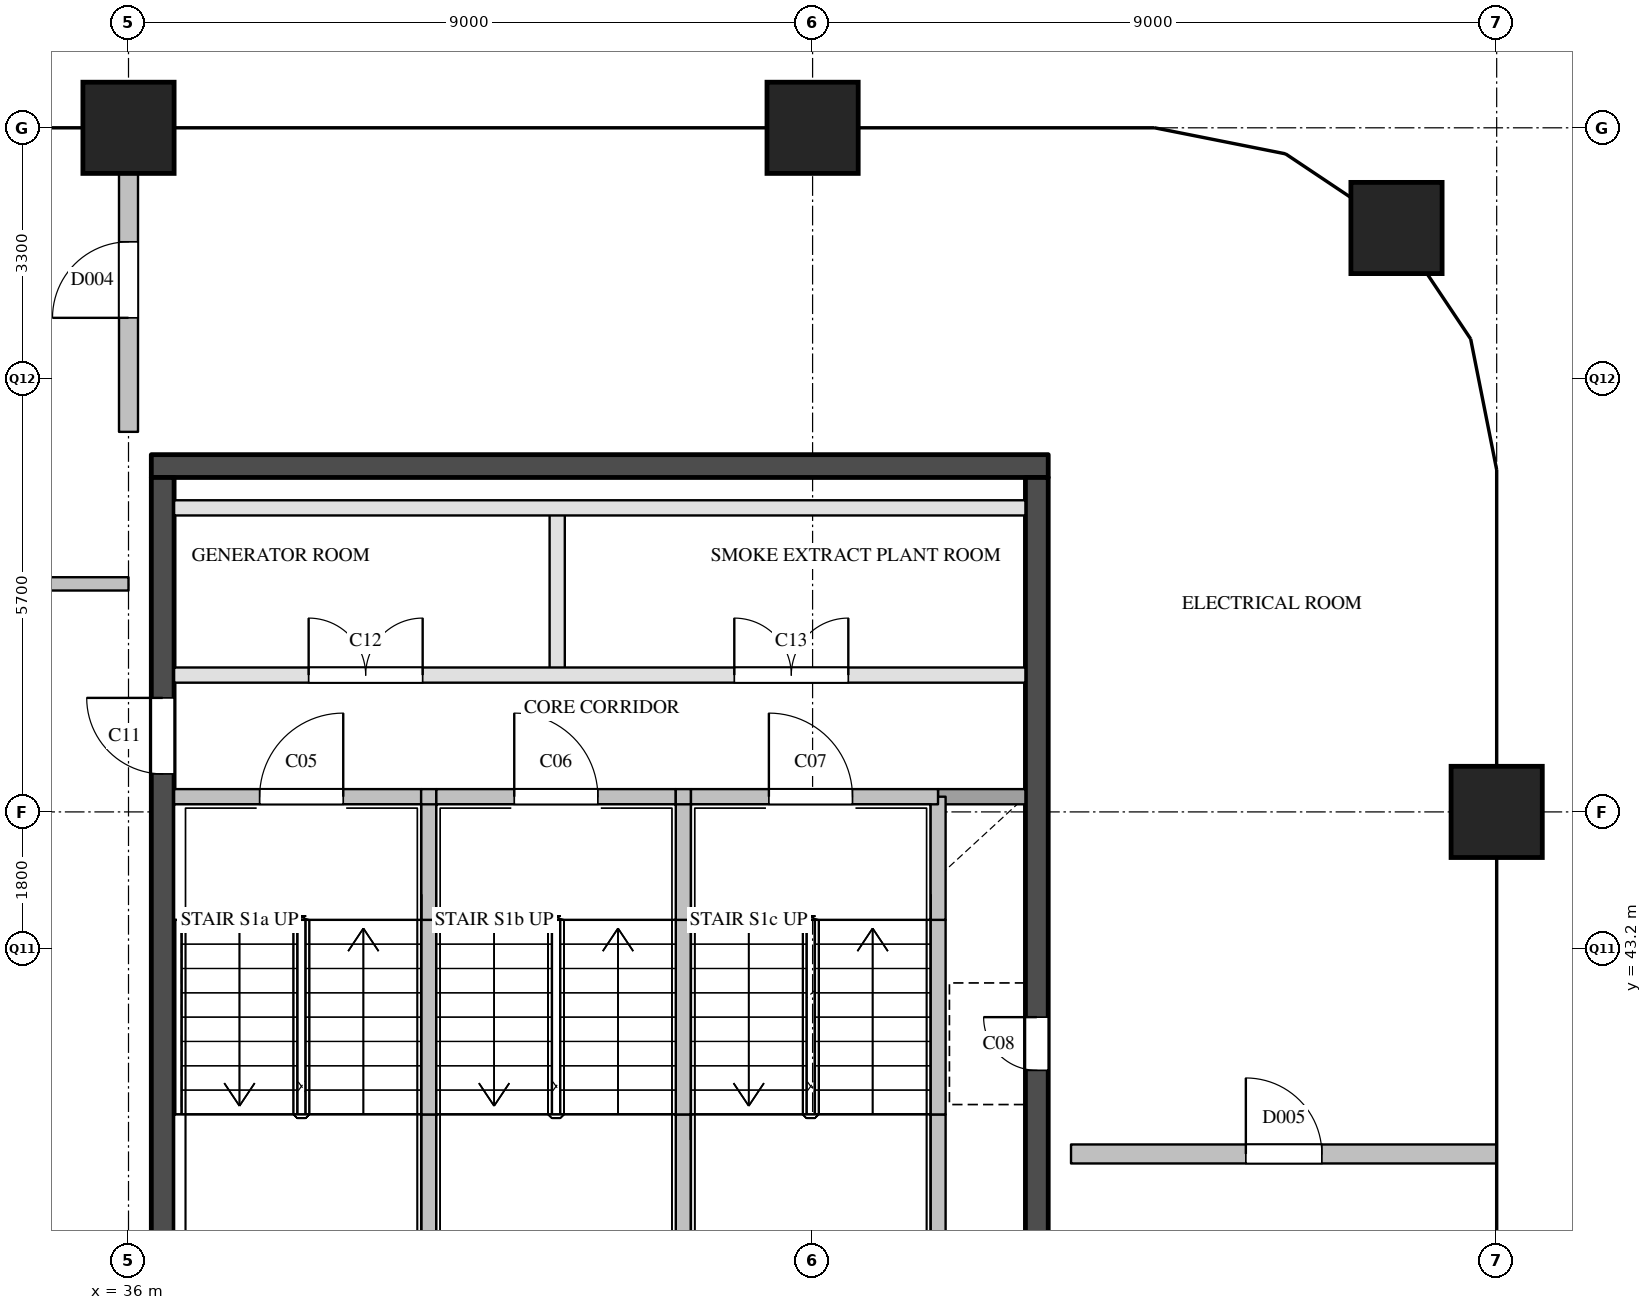
"""IFC4 building model, lengths in metres.
Left out: names, types, materials, properties, quantities, classifications, styles, units other than length and angle.
Written with IfcOpenShell. Run it as: python <this file> out.ifc"""

import sys

from ifc_helpers import new_model, si_unit, direction, frame, frame_2d, origin, origin_2d, place, context, subcontext, project, spatial, rectangle, extrude, element, fill, save


model = new_model("IFC4")
c1 = context("Model", 3, precision=1e-05, world=origin(), true_north=direction((0.0, 1.0)))
c2 = subcontext(c1, "Body", "Model", "MODEL_VIEW")
j1 = project(units=[si_unit("LENGTHUNIT", "METRE"), si_unit("PLANEANGLEUNIT", "RADIAN")], contexts=[c1])
p1 = place(None, origin())
s1 = spatial("IfcSite", under=j1, at=p1, CompositionType="ELEMENT")
p2 = place(p1, origin())
s2 = spatial("IfcBuilding", under=s1, at=p2, CompositionType="ELEMENT")
p3 = place(p2, frame((0.0, 0.0, 295.2)))
s3 = spatial("IfcBuildingStorey", under=s2, at=p3, CompositionType="ELEMENT", Elevation=295.2)
for number, where, z_axis, x_axis in (
    (1, (36.0, 54.0, 0.0), (0.0, 0.0, 1.0), (1.0, 0.0, 0.0)),
    (2, (45.0, 54.0, 0.0), (0.0, 0.0, 1.0), (1.0, 0.0, 0.0)),
    (3, (54.0, 45.0, 0.0), (0.0, 0.0, 1.0), (1.0, 0.0, 0.0)),
    (4, (52.682, 52.682, 0.0), (0.0, 0.0, 1.0), (1.0, 0.0, 0.0)),
):
    element("IfcColumn", number, at=place(p3, frame(where, z_axis=z_axis, x_axis=x_axis)), inside=s3, PredefinedType="COLUMN", context=c2, shape_type="SweptSolid", body=[
        extrude(rectangle(XDim=1.2, YDim=1.2, at=origin_2d()), origin(), (0.0, 0.0, 1.0), 6.0),
    ])
p4 = place(p3, frame((36.3, 49.55, 0.0), z_axis=(0.0, 0.0, 1.0), x_axis=(1.0, 0.0, 0.0)))
e5 = element("IfcWall", 5, at=p4, inside=s3, PredefinedType="SHEAR", context=c2, shape_type="SweptSolid", body=[
    extrude(rectangle(XDim=11.8, YDim=0.3, at=frame_2d((5.9, 0.0))), origin(), (0.0, 0.0, 1.0), 5.7),
])
p5 = place(p3, frame((36.45, 29.1, 0.0), z_axis=(0.0, 0.0, 1.0), x_axis=(0.0, 1.0, 0.0)))
e6 = element("IfcWall", 6, at=p5, inside=s3, PredefinedType="SHEAR", context=c2, shape_type="SweptSolid", body=[
    extrude(rectangle(XDim=20.3, YDim=0.3, at=frame_2d((10.15, 0.0))), origin(), (0.0, 0.0, 1.0), 5.7),
])
p6 = place(p5, frame((3.6, 0.0, 0.0)))
e7 = element("IfcOpeningElement", 7, at=p6, cuts=e6, PredefinedType="OPENING", context=c2, shape_type="SweptSolid", body=[
    extrude(rectangle(XDim=1.8, YDim=2.1, at=frame_2d((0.9, 1.05))), frame((0.0, 0.16, 0.0), z_axis=(0.0, -1.0, 0.0), x_axis=(1.0, 0.0, 0.0)), (0.0, 0.0, 1.0), 0.32),
])
p7 = place(p5, frame((16.4, 0.0, 0.0)))
e8 = element("IfcOpeningElement", 8, at=p7, cuts=e6, PredefinedType="OPENING", context=c2, shape_type="SweptSolid", body=[
    extrude(rectangle(XDim=1.0, YDim=2.1, at=frame_2d((0.5, 1.05))), frame((0.0, 0.16, 0.0), z_axis=(0.0, -1.0, 0.0), x_axis=(1.0, 0.0, 0.0)), (0.0, 0.0, 1.0), 0.32),
])
p8 = place(p3, frame((47.95, 29.1, 0.0), z_axis=(0.0, 0.0, 1.0), x_axis=(0.0, 1.0, 0.0)))
e9 = element("IfcWall", 9, at=p8, inside=s3, PredefinedType="SHEAR", context=c2, shape_type="SweptSolid", body=[
    extrude(rectangle(XDim=20.3, YDim=0.3, at=frame_2d((10.15, 0.0))), origin(), (0.0, 0.0, 1.0), 5.7),
])
p9 = place(p8, frame((12.5, 0.0, 0.0)))
e10 = element("IfcOpeningElement", 10, at=p9, cuts=e9, PredefinedType="OPENING", context=c2, shape_type="SweptSolid", body=[
    extrude(rectangle(XDim=0.7, YDim=2.1, at=frame_2d((0.35, 1.05))), frame((0.0, 0.16, 0.0), z_axis=(0.0, -1.0, 0.0), x_axis=(1.0, 0.0, 0.0)), (0.0, 0.0, 1.0), 0.32),
])
p10 = place(p3, frame((39.95, 39.0, 0.0), z_axis=(0.0, 0.0, 1.0), x_axis=(0.0, 1.0, 0.0)))
e11 = element("IfcWall", 11, at=p10, inside=s3, PredefinedType="SOLIDWALL", context=c2, shape_type="SweptSolid", body=[
    extrude(rectangle(XDim=2.02, YDim=0.2, at=frame_2d((1.01, 0.0))), origin(), (0.0, 0.0, 1.0), 5.7),
])
p11 = place(p3, frame((39.95, 41.02, 0.0), z_axis=(0.0, 0.0, 1.0), x_axis=(0.0, 1.0, 0.0)))
e12 = element("IfcWall", 12, at=p11, inside=s3, PredefinedType="SOLIDWALL", context=c2, shape_type="SweptSolid", body=[
    extrude(rectangle(XDim=2.56, YDim=0.2, at=frame_2d((1.28, 0.0))), origin(), (0.0, 0.0, 1.0), 5.7),
])
p12 = place(p3, frame((39.95, 43.58, 0.0), z_axis=(0.0, 0.0, 1.0), x_axis=(0.0, 1.0, 0.0)))
e13 = element("IfcWall", 13, at=p12, inside=s3, PredefinedType="SOLIDWALL", context=c2, shape_type="SweptSolid", body=[
    extrude(rectangle(XDim=1.62, YDim=0.2, at=frame_2d((0.81, 0.0))), origin(), (0.0, 0.0, 1.0), 5.7),
])
p13 = place(p3, frame((41.64, 46.8, 0.0), z_axis=(0.0, 0.0, 1.0), x_axis=(0.0, 1.0, 0.0)))
e14 = element("IfcWall", 14, at=p13, inside=s3, PredefinedType="PARTITIONING", context=c2, shape_type="SweptSolid", body=[
    extrude(rectangle(XDim=2.2, YDim=0.2, at=frame_2d((1.1, 0.0))), origin(), (0.0, 0.0, 1.0), 5.7),
])
p14 = place(p3, frame((43.3, 39.0, 0.0), z_axis=(0.0, 0.0, 1.0), x_axis=(0.0, 1.0, 0.0)))
e15 = element("IfcWall", 15, at=p14, inside=s3, PredefinedType="SOLIDWALL", context=c2, shape_type="SweptSolid", body=[
    extrude(rectangle(XDim=2.02, YDim=0.2, at=frame_2d((1.01, 0.0))), origin(), (0.0, 0.0, 1.0), 5.7),
])
p15 = place(p3, frame((43.3, 41.02, 0.0), z_axis=(0.0, 0.0, 1.0), x_axis=(0.0, 1.0, 0.0)))
e16 = element("IfcWall", 16, at=p15, inside=s3, PredefinedType="SOLIDWALL", context=c2, shape_type="SweptSolid", body=[
    extrude(rectangle(XDim=2.56, YDim=0.2, at=frame_2d((1.28, 0.0))), origin(), (0.0, 0.0, 1.0), 5.7),
])
p16 = place(p3, frame((43.3, 43.58, 0.0), z_axis=(0.0, 0.0, 1.0), x_axis=(0.0, 1.0, 0.0)))
e17 = element("IfcWall", 17, at=p16, inside=s3, PredefinedType="SOLIDWALL", context=c2, shape_type="SweptSolid", body=[
    extrude(rectangle(XDim=1.62, YDim=0.2, at=frame_2d((0.81, 0.0))), origin(), (0.0, 0.0, 1.0), 5.7),
])
p17 = place(p3, frame((46.65, 39.0, 0.0), z_axis=(0.0, 0.0, 1.0), x_axis=(0.0, 1.0, 0.0)))
e18 = element("IfcWall", 18, at=p17, inside=s3, PredefinedType="SOLIDWALL", context=c2, shape_type="SweptSolid", body=[
    extrude(rectangle(XDim=2.02, YDim=0.2, at=frame_2d((1.01, 0.0))), origin(), (0.0, 0.0, 1.0), 5.7),
])
p18 = place(p3, frame((46.65, 41.02, 0.0), z_axis=(0.0, 0.0, 1.0), x_axis=(0.0, 1.0, 0.0)))
e19 = element("IfcWall", 19, at=p18, inside=s3, PredefinedType="SOLIDWALL", context=c2, shape_type="SweptSolid", body=[
    extrude(rectangle(XDim=2.56, YDim=0.2, at=frame_2d((1.28, 0.0))), origin(), (0.0, 0.0, 1.0), 5.7),
])
p19 = place(p3, frame((46.65, 43.58, 0.0), z_axis=(0.0, 0.0, 1.0), x_axis=(0.0, 1.0, 0.0)))
e20 = element("IfcWall", 20, at=p19, inside=s3, PredefinedType="SOLIDWALL", context=c2, shape_type="SweptSolid", body=[
    extrude(rectangle(XDim=1.62, YDim=0.2, at=frame_2d((0.81, 0.0))), origin(), (0.0, 0.0, 1.0), 5.7),
])
p20 = place(p3, frame((46.65, 45.2, 0.0), z_axis=(0.0, 0.0, 1.0), x_axis=(1.0, 0.0, 0.0)))
e21 = element("IfcWall", 21, at=p20, inside=s3, PredefinedType="SOLIDWALL", context=c2, shape_type="SweptSolid", body=[
    extrude(rectangle(XDim=1.15, YDim=0.2, at=frame_2d((0.575, 0.0))), origin(), (0.0, 0.0, 1.0), 5.7),
])
p21 = place(p3, frame((36.6, 45.2, 0.0), z_axis=(0.0, 0.0, 1.0), x_axis=(1.0, 0.0, 0.0)))
e22 = element("IfcWall", 22, at=p21, inside=s3, PredefinedType="SOLIDWALL", context=c2, shape_type="SweptSolid", body=[
    extrude(rectangle(XDim=3.25, YDim=0.2, at=frame_2d((1.625, 0.0))), origin(), (0.0, 0.0, 1.0), 5.7),
])
p22 = place(p21, frame((1.125, 0.0, 0.0)))
e23 = element("IfcOpeningElement", 23, at=p22, cuts=e22, PredefinedType="OPENING", context=c2, shape_type="SweptSolid", body=[
    extrude(rectangle(XDim=1.1, YDim=2.1, at=frame_2d((0.55, 1.05))), frame((0.0, 0.11, 0.0), z_axis=(0.0, -1.0, 0.0), x_axis=(1.0, 0.0, 0.0)), (0.0, 0.0, 1.0), 0.22),
])
p23 = place(p3, frame((39.85, 45.2, 0.0), z_axis=(0.0, 0.0, 1.0), x_axis=(1.0, 0.0, 0.0)))
e24 = element("IfcWall", 24, at=p23, inside=s3, PredefinedType="SOLIDWALL", context=c2, shape_type="SweptSolid", body=[
    extrude(rectangle(XDim=0.2, YDim=0.2, at=frame_2d((0.1, 0.0))), origin(), (0.0, 0.0, 1.0), 5.7),
])
p24 = place(p3, frame((40.05, 45.2, 0.0), z_axis=(0.0, 0.0, 1.0), x_axis=(1.0, 0.0, 0.0)))
e25 = element("IfcWall", 25, at=p24, inside=s3, PredefinedType="SOLIDWALL", context=c2, shape_type="SweptSolid", body=[
    extrude(rectangle(XDim=3.15, YDim=0.2, at=frame_2d((1.575, 0.0))), origin(), (0.0, 0.0, 1.0), 5.7),
])
p25 = place(p24, frame((1.025, 0.0, 0.0)))
e26 = element("IfcOpeningElement", 26, at=p25, cuts=e25, PredefinedType="OPENING", context=c2, shape_type="SweptSolid", body=[
    extrude(rectangle(XDim=1.1, YDim=2.1, at=frame_2d((0.55, 1.05))), frame((0.0, 0.11, 0.0), z_axis=(0.0, -1.0, 0.0), x_axis=(1.0, 0.0, 0.0)), (0.0, 0.0, 1.0), 0.22),
])
p26 = place(p3, frame((43.2, 45.2, 0.0), z_axis=(0.0, 0.0, 1.0), x_axis=(1.0, 0.0, 0.0)))
e27 = element("IfcWall", 27, at=p26, inside=s3, PredefinedType="SOLIDWALL", context=c2, shape_type="SweptSolid", body=[
    extrude(rectangle(XDim=0.2, YDim=0.2, at=frame_2d((0.1, 0.0))), origin(), (0.0, 0.0, 1.0), 5.7),
])
p27 = place(p3, frame((43.4, 45.2, 0.0), z_axis=(0.0, 0.0, 1.0), x_axis=(1.0, 0.0, 0.0)))
e28 = element("IfcWall", 28, at=p27, inside=s3, PredefinedType="SOLIDWALL", context=c2, shape_type="SweptSolid", body=[
    extrude(rectangle(XDim=3.25, YDim=0.2, at=frame_2d((1.625, 0.0))), origin(), (0.0, 0.0, 1.0), 5.7),
])
p28 = place(p27, frame((1.025, 0.0, 0.0)))
e29 = element("IfcOpeningElement", 29, at=p28, cuts=e28, PredefinedType="OPENING", context=c2, shape_type="SweptSolid", body=[
    extrude(rectangle(XDim=1.1, YDim=2.1, at=frame_2d((0.55, 1.05))), frame((0.0, 0.11, 0.0), z_axis=(0.0, -1.0, 0.0), x_axis=(1.0, 0.0, 0.0)), (0.0, 0.0, 1.0), 0.22),
])
p29 = place(p3, frame((36.6, 46.8, 0.0), z_axis=(0.0, 0.0, 1.0), x_axis=(1.0, 0.0, 0.0)))
e30 = element("IfcWall", 30, at=p29, inside=s3, PredefinedType="PARTITIONING", context=c2, shape_type="SweptSolid", body=[
    extrude(rectangle(XDim=11.2, YDim=0.2, at=frame_2d((5.6, 0.0))), origin(), (0.0, 0.0, 1.0), 5.7),
])
p30 = place(p29, frame((1.77, 0.0, 0.0)))
e31 = element("IfcOpeningElement", 31, at=p30, cuts=e30, PredefinedType="OPENING", context=c2, shape_type="SweptSolid", body=[
    extrude(rectangle(XDim=1.5, YDim=2.1, at=frame_2d((0.75, 1.05))), frame((0.0, 0.11, 0.0), z_axis=(0.0, -1.0, 0.0), x_axis=(1.0, 0.0, 0.0)), (0.0, 0.0, 1.0), 0.22),
])
p31 = place(p29, frame((7.37, 0.0, 0.0)))
e32 = element("IfcOpeningElement", 32, at=p31, cuts=e30, PredefinedType="OPENING", context=c2, shape_type="SweptSolid", body=[
    extrude(rectangle(XDim=1.5, YDim=2.1, at=frame_2d((0.75, 1.05))), frame((0.0, 0.11, 0.0), z_axis=(0.0, -1.0, 0.0), x_axis=(1.0, 0.0, 0.0)), (0.0, 0.0, 1.0), 0.22),
])
p32 = place(p3, frame((36.6, 49.0, 0.0), z_axis=(0.0, 0.0, 1.0), x_axis=(1.0, 0.0, 0.0)))
e33 = element("IfcWall", 33, at=p32, inside=s3, PredefinedType="PARTITIONING", context=c2, shape_type="SweptSolid", body=[
    extrude(rectangle(XDim=11.2, YDim=0.2, at=frame_2d((5.6, 0.0))), origin(), (0.0, 0.0, 1.0), 5.7),
])
p33 = place(p3, frame((24.0, 48.0, 0.0), z_axis=(0.0, 0.0, 1.0), x_axis=(1.0, 0.0, 0.0)))
e34 = element("IfcWall", 34, at=p33, inside=s3, PredefinedType="PARTITIONING", context=c2, shape_type="SweptSolid", body=[
    extrude(rectangle(XDim=12.0, YDim=0.175, at=frame_2d((6.0, 0.0))), origin(), (0.0, 0.0, 1.0), 5.7),
])
p34 = place(p33, frame((5.5, 0.0, 0.0)))
e35 = element("IfcOpeningElement", 35, at=p34, cuts=e34, PredefinedType="OPENING", context=c2, shape_type="SweptSolid", body=[
    extrude(rectangle(XDim=1.0, YDim=2.1, at=frame_2d((0.5, 1.05))), frame((0.0, 0.097, 0.0), z_axis=(0.0, -1.0, 0.0), x_axis=(1.0, 0.0, 0.0)), (0.0, 0.0, 1.0), 0.195),
])
p35 = place(p3, frame((48.4, 40.5, 0.0), z_axis=(0.0, 0.0, 1.0), x_axis=(1.0, 0.0, 0.0)))
e36 = element("IfcWall", 36, at=p35, inside=s3, PredefinedType="PARTITIONING", context=c2, shape_type="SweptSolid", body=[
    extrude(rectangle(XDim=5.6, YDim=0.25, at=frame_2d((2.8, 0.0))), origin(), (0.0, 0.0, 1.0), 5.7),
])
p36 = place(p35, frame((2.3, 0.0, 0.0)))
e37 = element("IfcOpeningElement", 37, at=p36, cuts=e36, PredefinedType="OPENING", context=c2, shape_type="SweptSolid", body=[
    extrude(rectangle(XDim=1.0, YDim=2.1, at=frame_2d((0.5, 1.05))), frame((0.0, 0.135, 0.0), z_axis=(0.0, -1.0, 0.0), x_axis=(1.0, 0.0, 0.0)), (0.0, 0.0, 1.0), 0.27),
])
p37 = place(p3, frame((36.0, 50.0, 0.0), z_axis=(0.0, 0.0, 1.0), x_axis=(0.0, 1.0, 0.0)))
e38 = element("IfcWall", 38, at=p37, inside=s3, PredefinedType="PARTITIONING", context=c2, shape_type="SweptSolid", body=[
    extrude(rectangle(XDim=4.0, YDim=0.25, at=frame_2d((2.0, 0.0))), origin(), (0.0, 0.0, 1.0), 5.7),
])
p38 = place(p37, frame((1.5, 0.0, 0.0)))
e39 = element("IfcOpeningElement", 39, at=p38, cuts=e38, PredefinedType="OPENING", context=c2, shape_type="SweptSolid", body=[
    extrude(rectangle(XDim=1.0, YDim=2.1, at=frame_2d((0.5, 1.05))), frame((0.0, 0.135, 0.0), z_axis=(0.0, -1.0, 0.0), x_axis=(1.0, 0.0, 0.0)), (0.0, 0.0, 1.0), 0.27),
])
p39 = place(p22, origin())
e40 = element("IfcDoor", 40, at=p39, inside=s3, OperationType="SINGLE_SWING_RIGHT", PredefinedType="DOOR", context=c2, shape_type="SweptSolid", body=[
    extrude(rectangle(XDim=1.1, YDim=2.1, at=frame_2d((0.55, 1.05))), frame((0.0, 0.025, 0.0), z_axis=(0.0, -1.0, 0.0), x_axis=(1.0, 0.0, 0.0)), (0.0, 0.0, 1.0), 0.05),
])
fill(e23, e40)
p40 = place(p25, origin())
e41 = element("IfcDoor", 41, at=p40, inside=s3, OperationType="SINGLE_SWING_LEFT", PredefinedType="DOOR", context=c2, shape_type="SweptSolid", body=[
    extrude(rectangle(XDim=1.1, YDim=2.1, at=frame_2d((0.55, 1.05))), frame((0.0, 0.025, 0.0), z_axis=(0.0, -1.0, 0.0), x_axis=(1.0, 0.0, 0.0)), (0.0, 0.0, 1.0), 0.05),
])
fill(e26, e41)
p41 = place(p28, origin())
e42 = element("IfcDoor", 42, at=p41, inside=s3, OperationType="SINGLE_SWING_LEFT", PredefinedType="DOOR", context=c2, shape_type="SweptSolid", body=[
    extrude(rectangle(XDim=1.1, YDim=2.1, at=frame_2d((0.55, 1.05))), frame((0.0, 0.025, 0.0), z_axis=(0.0, -1.0, 0.0), x_axis=(1.0, 0.0, 0.0)), (0.0, 0.0, 1.0), 0.05),
])
fill(e29, e42)
p42 = place(p9, origin())
e43 = element("IfcDoor", 43, at=p42, inside=s3, OperationType="SINGLE_SWING_RIGHT", PredefinedType="DOOR", context=c2, shape_type="SweptSolid", body=[
    extrude(rectangle(XDim=0.7, YDim=2.1, at=frame_2d((0.35, 1.05))), frame((0.0, 0.025, 0.0), z_axis=(0.0, -1.0, 0.0), x_axis=(1.0, 0.0, 0.0)), (0.0, 0.0, 1.0), 0.05),
])
fill(e10, e43)
p43 = place(p7, origin())
e44 = element("IfcDoor", 44, at=p43, inside=s3, OperationType="SINGLE_SWING_RIGHT", PredefinedType="DOOR", context=c2, shape_type="SweptSolid", body=[
    extrude(rectangle(XDim=1.0, YDim=2.1, at=frame_2d((0.5, 1.05))), frame((0.0, 0.025, 0.0), z_axis=(0.0, -1.0, 0.0), x_axis=(1.0, 0.0, 0.0)), (0.0, 0.0, 1.0), 0.05),
])
fill(e8, e44)
p44 = place(p30, origin())
e45 = element("IfcDoor", 45, at=p44, inside=s3, OperationType="DOUBLE_DOOR_SINGLE_SWING", PredefinedType="DOOR", context=c2, shape_type="SweptSolid", body=[
    extrude(rectangle(XDim=1.5, YDim=2.1, at=frame_2d((0.75, 1.05))), frame((0.0, 0.025, 0.0), z_axis=(0.0, -1.0, 0.0), x_axis=(1.0, 0.0, 0.0)), (0.0, 0.0, 1.0), 0.05),
])
fill(e31, e45)
p45 = place(p31, origin())
e46 = element("IfcDoor", 46, at=p45, inside=s3, OperationType="DOUBLE_DOOR_SINGLE_SWING", PredefinedType="DOOR", context=c2, shape_type="SweptSolid", body=[
    extrude(rectangle(XDim=1.5, YDim=2.1, at=frame_2d((0.75, 1.05))), frame((0.0, 0.025, 0.0), z_axis=(0.0, -1.0, 0.0), x_axis=(1.0, 0.0, 0.0)), (0.0, 0.0, 1.0), 0.05),
])
fill(e32, e46)
p46 = place(p38, origin())
e47 = element("IfcDoor", 47, at=p46, inside=s3, OperationType="SINGLE_SWING_LEFT", PredefinedType="DOOR", context=c2, shape_type="SweptSolid", body=[
    extrude(rectangle(XDim=1.0, YDim=2.1, at=frame_2d((0.5, 1.05))), frame((0.0, 0.025, 0.0), z_axis=(0.0, -1.0, 0.0), x_axis=(1.0, 0.0, 0.0)), (0.0, 0.0, 1.0), 0.05),
])
fill(e39, e47)
p47 = place(p36, origin())
e48 = element("IfcDoor", 48, at=p47, inside=s3, OperationType="SINGLE_SWING_LEFT", PredefinedType="DOOR", context=c2, shape_type="SweptSolid", body=[
    extrude(rectangle(XDim=1.0, YDim=2.1, at=frame_2d((0.5, 1.05))), frame((0.0, 0.025, 0.0), z_axis=(0.0, -1.0, 0.0), x_axis=(1.0, 0.0, 0.0)), (0.0, 0.0, 1.0), 0.05),
])
fill(e37, e48)
save(model, sys.argv[1])
